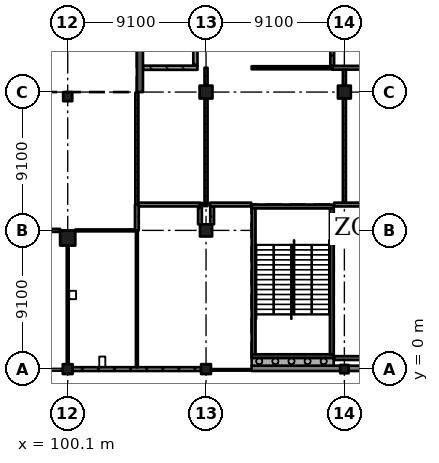
"""IFC4 building model, lengths in metres.
Left out: names, types, materials, properties, quantities, classifications, styles, units other than length and angle.
Written with IfcOpenShell. Run it as: python <this file> out.ifc"""

import sys

from ifc_helpers import new_model, si_unit, direction, frame, frame_2d, origin, origin_2d, place, context, subcontext, project, spatial, rectangle, extrude, element, fill, save


model = new_model("IFC4")
c1 = context("Model", 3, precision=1e-05, world=origin(), true_north=direction((0.0, 1.0)))
c2 = subcontext(c1, "Body", "Model", "MODEL_VIEW")
j1 = project(units=[si_unit("LENGTHUNIT", "METRE"), si_unit("PLANEANGLEUNIT", "RADIAN")], contexts=[c1])
p1 = place(None, origin())
s1 = spatial("IfcSite", under=j1, at=p1, CompositionType="ELEMENT")
p2 = place(p1, origin())
s2 = spatial("IfcBuilding", under=s1, at=p2, CompositionType="ELEMENT")
p3 = place(p2, frame((0.0, 0.0, 6.37)))
s3 = spatial("IfcBuildingStorey", under=s2, at=p3, CompositionType="ELEMENT", Elevation=6.37)
p4 = place(p3, frame((100.1, -0.025, 0.0), z_axis=(0.0, 0.0, 1.0), x_axis=(1.0, 0.0, 0.0)))
e1 = element("IfcColumn", 1, at=p4, inside=s3, PredefinedType="COLUMN", context=c2, shape_type="SweptSolid", body=[
    extrude(rectangle(XDim=0.65, YDim=0.65, at=origin_2d()), origin(), (0.0, 0.0, 1.0), 4.55),
])
p5 = place(p3, frame((100.1, 8.6, 0.0), z_axis=(0.0, 0.0, 1.0), x_axis=(1.0, 0.0, 0.0)))
e2 = element("IfcColumn", 2, at=p5, inside=s3, PredefinedType="COLUMN", context=c2, shape_type="SweptSolid", body=[
    extrude(rectangle(XDim=1.0, YDim=1.0, at=origin_2d()), origin(), (0.0, 0.0, 1.0), 4.55),
])
p6 = place(p3, frame((100.1, 17.9, 0.0), z_axis=(0.0, 0.0, 1.0), x_axis=(1.0, 0.0, 0.0)))
e3 = element("IfcColumn", 3, at=p6, inside=s3, PredefinedType="COLUMN", context=c2, shape_type="SweptSolid", body=[
    extrude(rectangle(XDim=0.6, YDim=0.6, at=origin_2d()), origin(), (0.0, 0.0, 1.0), 4.55),
])
p7 = place(p3, frame((109.2, -0.025, 0.0), z_axis=(0.0, 0.0, 1.0), x_axis=(1.0, 0.0, 0.0)))
e4 = element("IfcColumn", 4, at=p7, inside=s3, PredefinedType="COLUMN", context=c2, shape_type="SweptSolid", body=[
    extrude(rectangle(XDim=0.65, YDim=0.65, at=origin_2d()), origin(), (0.0, 0.0, 1.0), 4.55),
])
p8 = place(p3, frame((109.2, 9.1, 0.0), z_axis=(0.0, 0.0, 1.0), x_axis=(1.0, 0.0, 0.0)))
e5 = element("IfcColumn", 5, at=p8, inside=s3, PredefinedType="COLUMN", context=c2, shape_type="SweptSolid", body=[
    extrude(rectangle(XDim=0.8, YDim=0.8, at=origin_2d()), origin(), (0.0, 0.0, 1.0), 4.55),
])
p9 = place(p3, frame((109.2, 18.2, 0.0), z_axis=(0.0, 0.0, 1.0), x_axis=(1.0, 0.0, 0.0)))
e6 = element("IfcColumn", 6, at=p9, inside=s3, PredefinedType="COLUMN", context=c2, shape_type="SweptSolid", body=[
    extrude(rectangle(XDim=0.85, YDim=0.85, at=origin_2d()), origin(), (0.0, 0.0, 1.0), 4.55),
])
p10 = place(p3, frame((118.3, -0.025, 0.0), z_axis=(0.0, 0.0, 1.0), x_axis=(1.0, 0.0, 0.0)))
e7 = element("IfcColumn", 7, at=p10, inside=s3, PredefinedType="COLUMN", context=c2, shape_type="SweptSolid", body=[
    extrude(rectangle(XDim=0.55, YDim=0.55, at=origin_2d()), origin(), (0.0, 0.0, 1.0), 4.55),
])
p11 = place(p3, frame((118.3, 9.1, 0.0), z_axis=(0.0, 0.0, 1.0), x_axis=(1.0, 0.0, 0.0)))
e8 = element("IfcColumn", 8, at=p11, inside=s3, PredefinedType="COLUMN", context=c2, shape_type="SweptSolid", body=[
    extrude(rectangle(XDim=0.7, YDim=0.7, at=origin_2d()), origin(), (0.0, 0.0, 1.0), 4.55),
])
p12 = place(p3, frame((118.3, 18.2, 0.0), z_axis=(0.0, 0.0, 1.0), x_axis=(1.0, 0.0, 0.0)))
e9 = element("IfcColumn", 9, at=p12, inside=s3, PredefinedType="COLUMN", context=c2, shape_type="SweptSolid", body=[
    extrude(rectangle(XDim=0.85, YDim=0.85, at=origin_2d()), origin(), (0.0, 0.0, 1.0), 4.55),
])
p13 = place(p3, frame((104.85, 40.95, 0.0), z_axis=(0.0, 0.0, 1.0), x_axis=(0.0, -1.0, 0.0)))
e10 = element("IfcWall", 10, at=p13, inside=s3, PredefinedType="SHEAR", context=c2, shape_type="SweptSolid", body=[
    extrude(rectangle(XDim=22.75, YDim=0.4, at=frame_2d((11.375, 0.0))), origin(), (0.0, 0.0, 1.0), 4.55),
])
p14 = place(p3, frame((117.6, 0.825, 0.0), z_axis=(0.0, 0.0, 1.0), x_axis=(-1.0, 0.0, 0.0)))
e11 = element("IfcWall", 11, at=p14, inside=s3, PredefinedType="SHEAR", context=c2, shape_type="SweptSolid", body=[
    extrude(rectangle(XDim=5.4, YDim=0.25, at=frame_2d((2.7, 0.0))), origin(), (0.0, 0.0, 1.0), 4.55),
])
p15 = place(p3, frame((117.6, 10.675, 0.0), z_axis=(0.0, 0.0, 1.0), x_axis=(-1.0, 0.0, 0.0)))
e12 = element("IfcWall", 12, at=p15, inside=s3, PredefinedType="SHEAR", context=c2, shape_type="SweptSolid", body=[
    extrude(rectangle(XDim=5.4, YDim=0.25, at=frame_2d((2.7, 0.0))), origin(), (0.0, 0.0, 1.0), 4.55),
])
p16 = place(p15, frame((1.5, 0.0, 0.0)))
e13 = element("IfcOpeningElement", 13, at=p16, cuts=e12, PredefinedType="OPENING", context=c2, shape_type="SweptSolid", body=[
    extrude(rectangle(XDim=2.4, YDim=2.1, at=frame_2d((1.2, 1.05))), frame((0.0, 0.135, 0.0), z_axis=(0.0, -1.0, 0.0), x_axis=(1.0, 0.0, 0.0)), (0.0, 0.0, 1.0), 0.27),
])
for number, where, z_axis, x_axis in (
    (14, (112.325, 10.55, 0.0), (0.0, 0.0, 1.0), (0.0, -1.0, 0.0)),
    (15, (117.475, 10.55, 0.0), (0.0, 0.0, 1.0), (0.0, -1.0, 0.0)),
):
    element("IfcWall", number, at=place(p3, frame(where, z_axis=z_axis, x_axis=x_axis)), inside=s3, PredefinedType="SHEAR", context=c2, shape_type="SweptSolid", body=[
        extrude(rectangle(XDim=9.6, YDim=0.25, at=frame_2d((4.8, 0.0))), origin(), (0.0, 0.0, 1.0), 4.55),
    ])
p17 = place(p3, frame((100.425, -0.025, 0.0), z_axis=(0.0, 0.0, 1.0), x_axis=(1.0, 0.0, 0.0)))
e16 = element("IfcWall", 16, at=p17, inside=s3, PredefinedType="SOLIDWALL", context=c2, shape_type="SweptSolid", body=[
    extrude(rectangle(XDim=8.45, YDim=0.25, at=frame_2d((4.225, 0.0))), origin(), (0.0, 0.0, 1.0), 3.5),
])
p18 = place(p3, frame((112.2, 0.025, 0.0), z_axis=(0.0, 0.0, 1.0), x_axis=(1.0, 0.0, 0.0)))
e17 = element("IfcWall", 17, at=p18, inside=s3, PredefinedType="SOLIDWALL", context=c2, shape_type="SweptSolid", body=[
    extrude(rectangle(XDim=5.825, YDim=0.35, at=frame_2d((2.913, 0.0))), origin(), (0.0, 0.0, 1.0), 3.5),
])
p19 = place(p3, frame((118.575, 0.025, 0.0), z_axis=(0.0, 0.0, 1.0), x_axis=(1.0, 0.0, 0.0)))
e18 = element("IfcWall", 18, at=p19, inside=s3, PredefinedType="SOLIDWALL", context=c2, shape_type="SweptSolid", body=[
    extrude(rectangle(XDim=8.55, YDim=0.35, at=frame_2d((4.275, 0.0))), origin(), (0.0, 0.0, 1.0), 3.5),
])
p20 = place(p3, frame((112.2, 0.45, 0.0), z_axis=(0.0, 0.0, 1.0), x_axis=(1.0, 0.0, 0.0)))
e19 = element("IfcWall", 19, at=p20, inside=s3, PredefinedType="SOLIDWALL", context=c2, shape_type="SweptSolid", body=[
    extrude(rectangle(XDim=5.4, YDim=0.5, at=frame_2d((2.7, 0.0))), origin(), (0.0, 0.0, 1.0), 4.55),
])
p21 = place(p3, frame((99.6, 9.1, 0.0), z_axis=(0.0, 0.0, 1.0), x_axis=(-1.0, 0.0, 0.0)))
e20 = element("IfcWall", 20, at=p21, inside=s3, PredefinedType="PARTITIONING", context=c2, shape_type="SweptSolid", body=[
    extrude(rectangle(XDim=8.1, YDim=0.2, at=frame_2d((4.05, 0.0))), origin(), (0.0, 0.0, 1.0), 3.55),
])
p22 = place(p21, frame((3.15, 0.0, 0.0)))
e21 = element("IfcOpeningElement", 21, at=p22, cuts=e20, PredefinedType="OPENING", context=c2, shape_type="SweptSolid", body=[
    extrude(rectangle(XDim=1.8, YDim=2.1, at=frame_2d((0.9, 1.05))), frame((0.0, 0.11, 0.0), z_axis=(0.0, -1.0, 0.0), x_axis=(1.0, 0.0, 0.0)), (0.0, 0.0, 1.0), 0.22),
])
p23 = place(p3, frame((100.1, 8.1, 0.0), z_axis=(0.0, 0.0, 1.0), x_axis=(0.0, -1.0, 0.0)))
e22 = element("IfcWall", 22, at=p23, inside=s3, PredefinedType="PARTITIONING", context=c2, shape_type="SweptSolid", body=[
    extrude(rectangle(XDim=7.8, YDim=0.125, at=frame_2d((3.9, 0.0))), origin(), (0.0, 0.0, 1.0), 3.6),
])
p24 = place(p3, frame((104.525, 9.1, 0.0), z_axis=(0.0, 0.0, 1.0), x_axis=(-1.0, 0.0, 0.0)))
e23 = element("IfcWall", 23, at=p24, inside=s3, PredefinedType="PARTITIONING", context=c2, shape_type="SweptSolid", body=[
    extrude(rectangle(XDim=3.925, YDim=0.125, at=frame_2d((1.962, 0.0))), origin(), (0.0, 0.0, 1.0), 3.55),
])
p25 = place(p24, frame((1.45, 0.0, 0.0)))
e24 = element("IfcOpeningElement", 24, at=p25, cuts=e23, PredefinedType="OPENING", context=c2, shape_type="SweptSolid", body=[
    extrude(rectangle(XDim=1.0, YDim=2.1, at=frame_2d((0.5, 1.05))), frame((0.0, 0.073, 0.0), z_axis=(0.0, -1.0, 0.0), x_axis=(1.0, 0.0, 0.0)), (0.0, 0.0, 1.0), 0.145),
])
p26 = place(p3, frame((104.65, 0.1, 0.0), z_axis=(0.0, 0.0, 1.0), x_axis=(0.0, 1.0, 0.0)))
e25 = element("IfcWall", 25, at=p26, inside=s3, PredefinedType="PARTITIONING", context=c2, shape_type="SweptSolid", body=[
    extrude(rectangle(XDim=9.0, YDim=0.125, at=frame_2d((4.5, 0.0))), origin(), (0.0, 0.0, 1.0), 4.25),
])
p27 = place(p3, frame((104.65, 9.1, 0.0), z_axis=(0.0, 0.0, 1.0), x_axis=(0.0, 1.0, 0.0)))
e26 = element("IfcWall", 26, at=p27, inside=s3, PredefinedType="SOLIDWALL", context=c2, shape_type="SweptSolid", body=[
    extrude(rectangle(XDim=1.7, YDim=0.25, at=frame_2d((0.85, 0.0))), origin(), (0.0, 0.0, 1.0), 4.25),
])
p28 = place(p3, frame((104.65, 10.8, 0.0), z_axis=(0.0, 0.0, 1.0), x_axis=(0.0, 1.0, 0.0)))
e27 = element("IfcWall", 27, at=p28, inside=s3, PredefinedType="PARTITIONING", context=c2, shape_type="SweptSolid", body=[
    extrude(rectangle(XDim=7.37, YDim=0.2, at=frame_2d((3.685, 0.0))), origin(), (0.0, 0.0, 1.0), 4.25),
])
p29 = place(p28, frame((0.95, 0.0, 0.0)))
e28 = element("IfcOpeningElement", 28, at=p29, cuts=e27, PredefinedType="OPENING", context=c2, shape_type="SweptSolid", body=[
    extrude(rectangle(XDim=1.8, YDim=2.4, at=frame_2d((0.9, 1.2))), frame((0.0, 0.11, 0.0), z_axis=(0.0, -1.0, 0.0), x_axis=(1.0, 0.0, 0.0)), (0.0, 0.0, 1.0), 0.22),
])
p30 = place(p28, frame((4.65, 0.0, 0.0)))
e29 = element("IfcOpeningElement", 29, at=p30, cuts=e27, PredefinedType="OPENING", context=c2, shape_type="SweptSolid", body=[
    extrude(rectangle(XDim=1.8, YDim=2.4, at=frame_2d((0.9, 1.2))), frame((0.0, 0.11, 0.0), z_axis=(0.0, -1.0, 0.0), x_axis=(1.0, 0.0, 0.0)), (0.0, 0.0, 1.0), 0.22),
])
p31 = place(p3, frame((105.05, 19.8, 0.0), z_axis=(0.0, 0.0, 1.0), x_axis=(1.0, 0.0, 0.0)))
e30 = element("IfcWall", 30, at=p31, inside=s3, PredefinedType="SOLIDWALL", context=c2, shape_type="SweptSolid", body=[
    extrude(rectangle(XDim=3.587, YDim=0.275, at=frame_2d((1.794, 0.0))), origin(), (0.0, 0.0, 1.0), 4.25),
])
p32 = place(p31, frame((1.15, 0.0, 0.0)))
e31 = element("IfcOpeningElement", 31, at=p32, cuts=e30, PredefinedType="OPENING", context=c2, shape_type="SweptSolid", body=[
    extrude(rectangle(XDim=1.2, YDim=2.4, at=frame_2d((0.6, 1.2))), frame((0.0, 0.147, 0.0), z_axis=(0.0, -1.0, 0.0), x_axis=(1.0, 0.0, 0.0)), (0.0, 0.0, 1.0), 0.295),
])
p33 = place(p3, frame((108.5, 19.938, 0.0), z_axis=(0.0, 0.0, 1.0), x_axis=(0.0, 1.0, 0.0)))
e32 = element("IfcWall", 32, at=p33, inside=s3, PredefinedType="SOLIDWALL", context=c2, shape_type="SweptSolid", body=[
    extrude(rectangle(XDim=6.962, YDim=0.275, at=frame_2d((3.481, 0.0))), origin(), (0.0, 0.0, 1.0), 4.25),
])
p34 = place(p3, frame((108.8, 9.5, 0.0), z_axis=(0.0, 0.0, 1.0), x_axis=(0.0, 1.0, 0.0)))
e33 = element("IfcWall", 33, at=p34, inside=s3, PredefinedType="SOLIDWALL", context=c2, shape_type="SweptSolid", body=[
    extrude(rectangle(XDim=1.175, YDim=0.25, at=frame_2d((0.587, 0.0))), origin(), (0.0, 0.0, 1.0), 4.25),
])
p35 = place(p3, frame((108.8, 10.8, 0.0), z_axis=(0.0, 0.0, 1.0), x_axis=(-1.0, 0.0, 0.0)))
e34 = element("IfcWall", 34, at=p35, inside=s3, PredefinedType="SOLIDWALL", context=c2, shape_type="SweptSolid", body=[
    extrude(rectangle(XDim=4.025, YDim=0.25, at=frame_2d((2.013, 0.0))), origin(), (0.0, 0.0, 1.0), 4.25),
])
p36 = place(p35, frame((1.65, 0.0, 0.0)))
e35 = element("IfcOpeningElement", 35, at=p36, cuts=e34, PredefinedType="OPENING", context=c2, shape_type="SweptSolid", body=[
    extrude(rectangle(XDim=0.8, YDim=2.1, at=frame_2d((0.4, 1.05))), frame((0.0, 0.135, 0.0), z_axis=(0.0, -1.0, 0.0), x_axis=(1.0, 0.0, 0.0)), (0.0, 0.0, 1.0), 0.27),
])
p37 = place(p3, frame((108.8, 10.8, 0.0), z_axis=(0.0, 0.0, 1.0), x_axis=(1.0, 0.0, 0.0)))
e36 = element("IfcWall", 36, at=p37, inside=s3, PredefinedType="PARTITIONING", context=c2, shape_type="SweptSolid", body=[
    extrude(rectangle(XDim=0.5, YDim=0.2, at=frame_2d((0.25, 0.0))), origin(), (0.0, 0.0, 1.0), 4.25),
])
p38 = place(p3, frame((109.2, 10.9, 0.0), z_axis=(0.0, 0.0, 1.0), x_axis=(0.0, 1.0, 0.0)))
e37 = element("IfcWall", 37, at=p38, inside=s3, PredefinedType="PARTITIONING", context=c2, shape_type="SweptSolid", body=[
    extrude(rectangle(XDim=6.875, YDim=0.2, at=frame_2d((3.438, 0.0))), origin(), (0.0, 0.0, 1.0), 3.55),
])
p39 = place(p38, frame((0.85, 0.0, 0.0)))
e38 = element("IfcOpeningElement", 38, at=p39, cuts=e37, PredefinedType="OPENING", context=c2, shape_type="SweptSolid", body=[
    extrude(rectangle(XDim=1.8, YDim=2.4, at=frame_2d((0.9, 1.2))), frame((0.0, 0.11, 0.0), z_axis=(0.0, -1.0, 0.0), x_axis=(1.0, 0.0, 0.0)), (0.0, 0.0, 1.0), 0.22),
])
p40 = place(p38, frame((4.25, 0.0, 0.0)))
e39 = element("IfcOpeningElement", 39, at=p40, cuts=e37, PredefinedType="OPENING", context=c2, shape_type="SweptSolid", body=[
    extrude(rectangle(XDim=1.8, YDim=2.4, at=frame_2d((0.9, 1.2))), frame((0.0, 0.11, 0.0), z_axis=(0.0, -1.0, 0.0), x_axis=(1.0, 0.0, 0.0)), (0.0, 0.0, 1.0), 0.22),
])
p41 = place(p3, frame((109.2, 18.625, 0.0), z_axis=(0.0, 0.0, 1.0), x_axis=(0.0, 1.0, 0.0)))
e40 = element("IfcWall", 40, at=p41, inside=s3, PredefinedType="PARTITIONING", context=c2, shape_type="SweptSolid", body=[
    extrude(rectangle(XDim=1.175, YDim=0.2, at=frame_2d((0.587, 0.0))), origin(), (0.0, 0.0, 1.0), 3.55),
])
p42 = place(p3, frame((109.6, 10.675, 0.0), z_axis=(0.0, 0.0, 1.0), x_axis=(0.0, -1.0, 0.0)))
e41 = element("IfcWall", 41, at=p42, inside=s3, PredefinedType="SOLIDWALL", context=c2, shape_type="SweptSolid", body=[
    extrude(rectangle(XDim=1.175, YDim=0.25, at=frame_2d((0.587, 0.0))), origin(), (0.0, 0.0, 1.0), 4.25),
])
p43 = place(p3, frame((112.17, 10.8, 0.0), z_axis=(0.0, 0.0, 1.0), x_axis=(-1.0, 0.0, 0.0)))
e42 = element("IfcWall", 42, at=p43, inside=s3, PredefinedType="SOLIDWALL", context=c2, shape_type="SweptSolid", body=[
    extrude(rectangle(XDim=2.695, YDim=0.25, at=frame_2d((1.347, 0.0))), origin(), (0.0, 0.0, 1.0), 4.25),
])
p44 = place(p3, frame((112.2, 19.8, 0.0), z_axis=(0.0, 0.0, 1.0), x_axis=(1.0, 0.0, 0.0)))
e43 = element("IfcWall", 43, at=p44, inside=s3, PredefinedType="PARTITIONING", context=c2, shape_type="SweptSolid", body=[
    extrude(rectangle(XDim=5.3, YDim=0.2, at=frame_2d((2.65, 0.0))), origin(), (0.0, 0.0, 1.0), 4.25),
])
p45 = place(p44, frame((1.75, 0.0, 0.0)))
e44 = element("IfcOpeningElement", 44, at=p45, cuts=e43, PredefinedType="OPENING", context=c2, shape_type="SweptSolid", body=[
    extrude(rectangle(XDim=1.8, YDim=2.4, at=frame_2d((0.9, 1.2))), frame((0.0, 0.11, 0.0), z_axis=(0.0, -1.0, 0.0), x_axis=(1.0, 0.0, 0.0)), (0.0, 0.0, 1.0), 0.22),
])
p46 = place(p3, frame((117.5, 19.8, 0.0), z_axis=(0.0, 0.0, 1.0), x_axis=(1.0, 0.0, 0.0)))
e45 = element("IfcWall", 45, at=p46, inside=s3, PredefinedType="SOLIDWALL", context=c2, shape_type="SweptSolid", body=[
    extrude(rectangle(XDim=3.8, YDim=0.25, at=frame_2d((1.9, 0.0))), origin(), (0.0, 0.0, 1.0), 4.25),
])
p47 = place(p46, frame((1.85, 0.0, 0.0)))
e46 = element("IfcOpeningElement", 46, at=p47, cuts=e45, PredefinedType="OPENING", context=c2, shape_type="SweptSolid", body=[
    extrude(rectangle(XDim=1.0, YDim=2.1, at=frame_2d((0.5, 1.05))), frame((0.0, 0.135, 0.0), z_axis=(0.0, -1.0, 0.0), x_axis=(1.0, 0.0, 0.0)), (0.0, 0.0, 1.0), 0.27),
])
p48 = place(p3, frame((117.5, 19.925, 0.0), z_axis=(0.0, 0.0, 1.0), x_axis=(0.0, 1.0, 0.0)))
e47 = element("IfcWall", 47, at=p48, inside=s3, PredefinedType="SOLIDWALL", context=c2, shape_type="SweptSolid", body=[
    extrude(rectangle(XDim=2.845, YDim=0.25, at=frame_2d((1.422, 0.0))), origin(), (0.0, 0.0, 1.0), 4.25),
])
p49 = place(p3, frame((117.63, 8.75, 0.0), z_axis=(0.0, 0.0, 1.0), x_axis=(1.0, 0.0, 0.0)))
e48 = element("IfcWall", 48, at=p49, inside=s3, PredefinedType="SOLIDWALL", context=c2, shape_type="SweptSolid", body=[
    extrude(rectangle(XDim=0.67, YDim=0.25, at=frame_2d((0.335, 0.0))), origin(), (0.0, 0.0, 1.0), 4.25),
])
p50 = place(p3, frame((117.95, 9.45, 0.0), z_axis=(0.0, 0.0, 1.0), x_axis=(-1.0, 0.0, 0.0)))
e49 = element("IfcWall", 49, at=p50, inside=s3, PredefinedType="SOLIDWALL", context=c2, shape_type="SweptSolid", body=[
    extrude(rectangle(XDim=0.32, YDim=0.25, at=frame_2d((0.16, 0.0))), origin(), (0.0, 0.0, 1.0), 4.25),
])
p51 = place(p3, frame((117.63, 10.8, 0.0), z_axis=(0.0, 0.0, 1.0), x_axis=(1.0, 0.0, 0.0)))
e50 = element("IfcWall", 50, at=p51, inside=s3, PredefinedType="SOLIDWALL", context=c2, shape_type="SweptSolid", body=[
    extrude(rectangle(XDim=3.64, YDim=0.25, at=frame_2d((1.82, 0.0))), origin(), (0.0, 0.0, 1.0), 4.25),
])
p52 = place(p51, frame((1.69, 0.0, 0.0)))
e51 = element("IfcOpeningElement", 51, at=p52, cuts=e50, PredefinedType="OPENING", context=c2, shape_type="SweptSolid", body=[
    extrude(rectangle(XDim=1.0, YDim=2.1, at=frame_2d((0.5, 1.05))), frame((0.0, 0.135, 0.0), z_axis=(0.0, -1.0, 0.0), x_axis=(1.0, 0.0, 0.0)), (0.0, 0.0, 1.0), 0.27),
])
p53 = place(p3, frame((118.3, 10.925, 0.0), z_axis=(0.0, 0.0, 1.0), x_axis=(0.0, 1.0, 0.0)))
e52 = element("IfcWall", 52, at=p53, inside=s3, PredefinedType="PARTITIONING", context=c2, shape_type="SweptSolid", body=[
    extrude(rectangle(XDim=6.85, YDim=0.2, at=frame_2d((3.425, 0.0))), origin(), (0.0, 0.0, 1.0), 3.55),
])
p54 = place(p53, frame((0.85, 0.0, 0.0)))
e53 = element("IfcOpeningElement", 53, at=p54, cuts=e52, PredefinedType="OPENING", context=c2, shape_type="SweptSolid", body=[
    extrude(rectangle(XDim=1.8, YDim=2.4, at=frame_2d((0.9, 1.2))), frame((0.0, 0.11, 0.0), z_axis=(0.0, -1.0, 0.0), x_axis=(1.0, 0.0, 0.0)), (0.0, 0.0, 1.0), 0.22),
])
p55 = place(p53, frame((4.25, 0.0, 0.0)))
e54 = element("IfcOpeningElement", 54, at=p55, cuts=e52, PredefinedType="OPENING", context=c2, shape_type="SweptSolid", body=[
    extrude(rectangle(XDim=1.8, YDim=2.4, at=frame_2d((0.9, 1.2))), frame((0.0, 0.11, 0.0), z_axis=(0.0, -1.0, 0.0), x_axis=(1.0, 0.0, 0.0)), (0.0, 0.0, 1.0), 0.22),
])
p56 = place(p3, frame((118.3, 18.625, 0.0), z_axis=(0.0, 0.0, 1.0), x_axis=(0.0, 1.0, 0.0)))
e55 = element("IfcWall", 55, at=p56, inside=s3, PredefinedType="PARTITIONING", context=c2, shape_type="SweptSolid", body=[
    extrude(rectangle(XDim=1.05, YDim=0.2, at=frame_2d((0.525, 0.0))), origin(), (0.0, 0.0, 1.0), 3.55),
])
p57 = place(p3, frame((121.27, 0.7, 0.0), z_axis=(0.0, 0.0, 1.0), x_axis=(-1.0, 0.0, 0.0)))
e56 = element("IfcWall", 56, at=p57, inside=s3, PredefinedType="SOLIDWALL", context=c2, shape_type="SweptSolid", body=[
    extrude(rectangle(XDim=3.64, YDim=0.25, at=frame_2d((1.82, 0.0))), origin(), (0.0, 0.0, 1.0), 4.25),
])
p58 = place(p32, origin())
e57 = element("IfcDoor", 57, at=p58, inside=s3, OperationType="SINGLE_SWING_RIGHT", PredefinedType="DOOR", context=c2, shape_type="SweptSolid", body=[
    extrude(rectangle(XDim=1.2, YDim=2.4, at=frame_2d((0.6, 1.2))), frame((0.0, 0.025, 0.0), z_axis=(0.0, -1.0, 0.0), x_axis=(1.0, 0.0, 0.0)), (0.0, 0.0, 1.0), 0.05),
])
fill(e31, e57)
p59 = place(p36, origin())
e58 = element("IfcDoor", 58, at=p59, inside=s3, OperationType="SINGLE_SWING_LEFT", PredefinedType="DOOR", context=c2, shape_type="SweptSolid", body=[
    extrude(rectangle(XDim=0.8, YDim=2.1, at=frame_2d((0.4, 1.05))), frame((0.0, 0.025, 0.0), z_axis=(0.0, -1.0, 0.0), x_axis=(1.0, 0.0, 0.0)), (0.0, 0.0, 1.0), 0.05),
])
fill(e35, e58)
p60 = place(p25, origin())
e59 = element("IfcDoor", 59, at=p60, inside=s3, OperationType="SINGLE_SWING_RIGHT", PredefinedType="DOOR", context=c2, shape_type="SweptSolid", body=[
    extrude(rectangle(XDim=1.0, YDim=2.1, at=frame_2d((0.5, 1.05))), frame((0.0, 0.025, 0.0), z_axis=(0.0, -1.0, 0.0), x_axis=(1.0, 0.0, 0.0)), (0.0, 0.0, 1.0), 0.05),
])
fill(e24, e59)
p61 = place(p54, origin())
e60 = element("IfcDoor", 60, at=p61, inside=s3, OperationType="DOUBLE_DOOR_SINGLE_SWING", PredefinedType="DOOR", context=c2, shape_type="SweptSolid", body=[
    extrude(rectangle(XDim=1.8, YDim=2.4, at=frame_2d((0.9, 1.2))), frame((0.0, 0.025, 0.0), z_axis=(0.0, -1.0, 0.0), x_axis=(1.0, 0.0, 0.0)), (0.0, 0.0, 1.0), 0.05),
])
fill(e53, e60)
p62 = place(p55, origin())
e61 = element("IfcDoor", 61, at=p62, inside=s3, OperationType="DOUBLE_DOOR_SINGLE_SWING", PredefinedType="DOOR", context=c2, shape_type="SweptSolid", body=[
    extrude(rectangle(XDim=1.8, YDim=2.4, at=frame_2d((0.9, 1.2))), frame((0.0, 0.025, 0.0), z_axis=(0.0, -1.0, 0.0), x_axis=(1.0, 0.0, 0.0)), (0.0, 0.0, 1.0), 0.05),
])
fill(e54, e61)
p63 = place(p39, origin())
e62 = element("IfcDoor", 62, at=p63, inside=s3, OperationType="DOUBLE_DOOR_SINGLE_SWING", PredefinedType="DOOR", context=c2, shape_type="SweptSolid", body=[
    extrude(rectangle(XDim=1.8, YDim=2.4, at=frame_2d((0.9, 1.2))), frame((0.0, 0.025, 0.0), z_axis=(0.0, -1.0, 0.0), x_axis=(1.0, 0.0, 0.0)), (0.0, 0.0, 1.0), 0.05),
])
fill(e38, e62)
p64 = place(p40, origin())
e63 = element("IfcDoor", 63, at=p64, inside=s3, OperationType="DOUBLE_DOOR_SINGLE_SWING", PredefinedType="DOOR", context=c2, shape_type="SweptSolid", body=[
    extrude(rectangle(XDim=1.8, YDim=2.4, at=frame_2d((0.9, 1.2))), frame((0.0, 0.025, 0.0), z_axis=(0.0, -1.0, 0.0), x_axis=(1.0, 0.0, 0.0)), (0.0, 0.0, 1.0), 0.05),
])
fill(e39, e63)
p65 = place(p45, origin())
e64 = element("IfcDoor", 64, at=p65, inside=s3, OperationType="DOUBLE_DOOR_SINGLE_SWING", PredefinedType="DOOR", context=c2, shape_type="SweptSolid", body=[
    extrude(rectangle(XDim=1.8, YDim=2.4, at=frame_2d((0.9, 1.2))), frame((0.0, 0.025, 0.0), z_axis=(0.0, -1.0, 0.0), x_axis=(1.0, 0.0, 0.0)), (0.0, 0.0, 1.0), 0.05),
])
fill(e44, e64)
p66 = place(p29, origin())
e65 = element("IfcDoor", 65, at=p66, inside=s3, OperationType="DOUBLE_DOOR_SINGLE_SWING", PredefinedType="DOOR", context=c2, shape_type="SweptSolid", body=[
    extrude(rectangle(XDim=1.8, YDim=2.4, at=frame_2d((0.9, 1.2))), frame((0.0, 0.025, 0.0), z_axis=(0.0, -1.0, 0.0), x_axis=(1.0, 0.0, 0.0)), (0.0, 0.0, 1.0), 0.05),
])
fill(e28, e65)
p67 = place(p30, origin())
e66 = element("IfcDoor", 66, at=p67, inside=s3, OperationType="DOUBLE_DOOR_SINGLE_SWING", PredefinedType="DOOR", context=c2, shape_type="SweptSolid", body=[
    extrude(rectangle(XDim=1.8, YDim=2.4, at=frame_2d((0.9, 1.2))), frame((0.0, 0.025, 0.0), z_axis=(0.0, -1.0, 0.0), x_axis=(1.0, 0.0, 0.0)), (0.0, 0.0, 1.0), 0.05),
])
fill(e29, e66)
p68 = place(p16, origin())
e67 = element("IfcDoor", 67, at=p68, inside=s3, OperationType="DOUBLE_DOOR_SINGLE_SWING", PredefinedType="DOOR", context=c2, shape_type="SweptSolid", body=[
    extrude(rectangle(XDim=2.4, YDim=2.1, at=frame_2d((1.2, 1.05))), frame((0.0, 0.025, 0.0), z_axis=(0.0, -1.0, 0.0), x_axis=(1.0, 0.0, 0.0)), (0.0, 0.0, 1.0), 0.05),
])
fill(e13, e67)
save(model, sys.argv[1])
